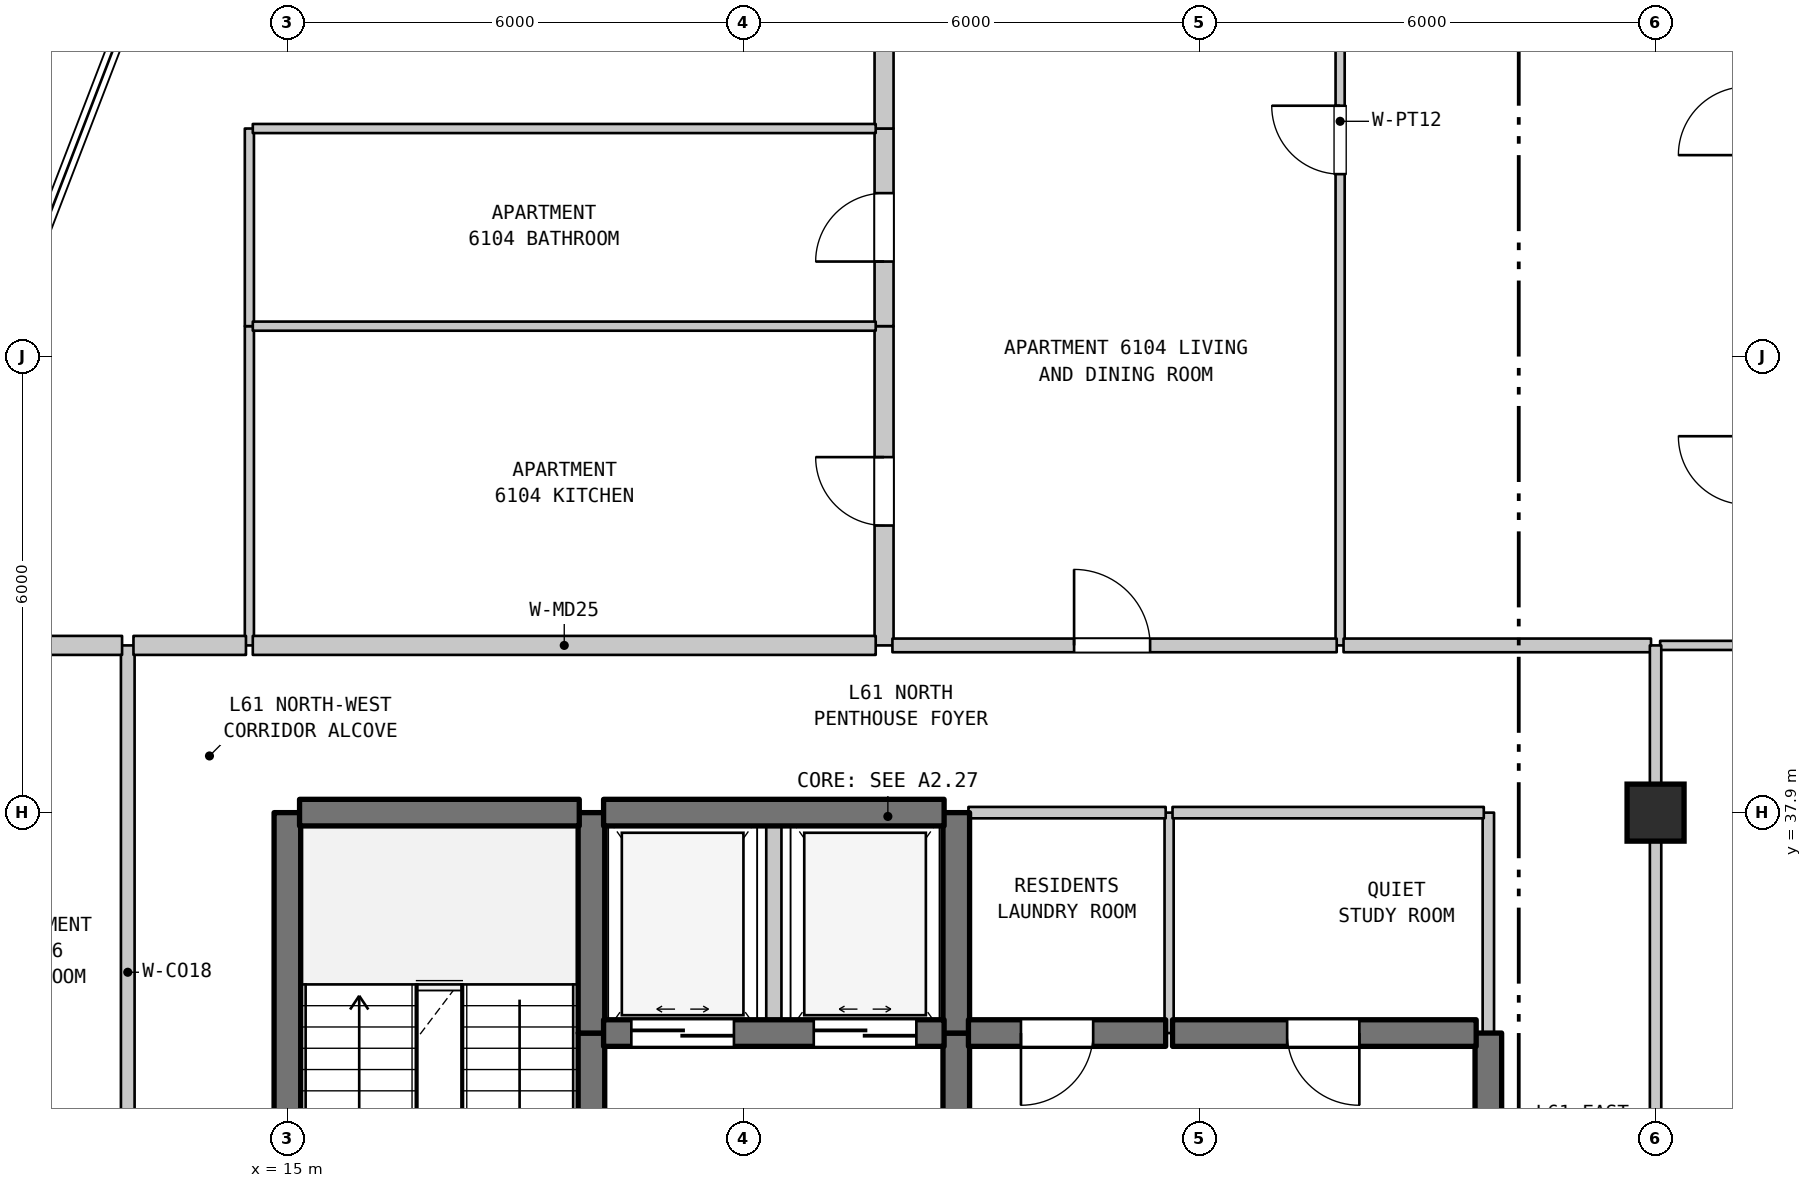
"""IFC4 building model, lengths in metres.
Left out: names, types, materials, properties, quantities, classifications, styles, units other than length and angle.
Written with IfcOpenShell. Run it as: python <this file> out.ifc"""

import sys

from ifc_helpers import new_model, si_unit, direction, frame, frame_2d, origin, origin_2d, place, context, subcontext, project, spatial, rectangle, extrude, element, fill, save


model = new_model("IFC4")
c1 = context("Model", 3, precision=1e-05, world=origin(), true_north=direction((0.0, 1.0)))
c2 = subcontext(c1, "Body", "Model", "MODEL_VIEW")
j1 = project(units=[si_unit("LENGTHUNIT", "METRE"), si_unit("PLANEANGLEUNIT", "RADIAN")], contexts=[c1])
p1 = place(None, origin())
s1 = spatial("IfcSite", under=j1, at=p1, CompositionType="ELEMENT")
p2 = place(p1, origin())
s2 = spatial("IfcBuilding", under=s1, at=p2, CompositionType="ELEMENT")
p3 = place(p2, frame((0.0, 0.0, 247.3)))
s3 = spatial("IfcBuildingStorey", under=s2, at=p3, CompositionType="ELEMENT", Elevation=247.3)
p4 = place(p3, frame((33.0, 37.9, 0.0), z_axis=(0.0, 0.0, 1.0), x_axis=(1.0, 0.0, 0.0)))
e1 = element("IfcColumn", 1, at=p4, inside=s3, PredefinedType="COLUMN", context=c2, shape_type="SweptSolid", body=[
    extrude(rectangle(XDim=0.75, YDim=0.75, at=origin_2d()), origin(), (0.0, 0.0, 1.0), 3.7),
])
p5 = place(p3, frame((12.9, 31.5, 0.0), z_axis=(0.0, 0.0, 1.0), x_axis=(0.0, 1.0, 0.0)))
e2 = element("IfcWall", 2, at=p5, inside=s3, PredefinedType="STANDARD", context=c2, shape_type="SweptSolid", body=[
    extrude(rectangle(XDim=8.6, YDim=0.18, at=frame_2d((4.3, 0.0))), origin(), (0.0, 0.0, 1.0), 3.39),
])
p6 = place(p3, frame((14.5, 40.1, 0.0), z_axis=(0.0, 0.0, 1.0), x_axis=(0.0, 1.0, 0.0)))
e3 = element("IfcWall", 3, at=p6, inside=s3, PredefinedType="PARTITIONING", context=c2, shape_type="SweptSolid", body=[
    extrude(rectangle(XDim=4.2, YDim=0.12, at=frame_2d((2.1, 0.0))), origin(), (0.0, 0.0, 1.0), 3.39),
])
p7 = place(p3, frame((14.5, 44.3, 0.0), z_axis=(0.0, 0.0, 1.0), x_axis=(0.0, 1.0, 0.0)))
e4 = element("IfcWall", 4, at=p7, inside=s3, PredefinedType="PARTITIONING", context=c2, shape_type="SweptSolid", body=[
    extrude(rectangle(XDim=2.6, YDim=0.12, at=frame_2d((1.3, 0.0))), origin(), (0.0, 0.0, 1.0), 3.39),
])
p8 = place(p3, frame((15.0, 31.1, 0.0), z_axis=(0.0, 0.0, 1.0), x_axis=(0.0, 1.0, 0.0)))
e5 = element("IfcWall", 5, at=p8, inside=s3, PredefinedType="SHEAR", context=c2, shape_type="SweptSolid", body=[
    extrude(rectangle(XDim=6.8, YDim=0.35, at=frame_2d((3.4, 0.0))), origin(), (0.0, 0.0, 1.0), 3.39),
])
p9 = place(p3, frame((19.0, 29.5, 0.0), z_axis=(0.0, 0.0, 1.0), x_axis=(0.0, 1.0, 0.0)))
e6 = element("IfcWall", 6, at=p9, inside=s3, PredefinedType="SHEAR", context=c2, shape_type="SweptSolid", body=[
    extrude(rectangle(XDim=5.5, YDim=0.35, at=frame_2d((2.75, 0.0))), origin(), (0.0, 0.0, 1.0), 3.39),
])
p10 = place(p9, frame((2.025, 0.0, 0.0)))
e7 = element("IfcOpeningElement", 7, at=p10, cuts=e6, PredefinedType="OPENING", context=c2, shape_type="SweptSolid", body=[
    extrude(rectangle(XDim=1.1, YDim=2.15, at=frame_2d((0.55, 1.075))), frame((0.0, 0.185, 0.0), z_axis=(0.0, -1.0, 0.0), x_axis=(1.0, 0.0, 0.0)), (0.0, 0.0, 1.0), 0.37),
])
p11 = place(p3, frame((19.0, 35.0, 0.0), z_axis=(0.0, 0.0, 1.0), x_axis=(0.0, 1.0, 0.0)))
e8 = element("IfcWall", 8, at=p11, inside=s3, PredefinedType="SHEAR", context=c2, shape_type="SweptSolid", body=[
    extrude(rectangle(XDim=2.9, YDim=0.35, at=frame_2d((1.45, 0.0))), origin(), (0.0, 0.0, 1.0), 3.39),
])
p12 = place(p3, frame((21.4, 35.0, 0.0), z_axis=(0.0, 0.0, 1.0), x_axis=(0.0, 1.0, 0.0)))
e9 = element("IfcWall", 9, at=p12, inside=s3, PredefinedType="STANDARD", context=c2, shape_type="SweptSolid", body=[
    extrude(rectangle(XDim=2.9, YDim=0.2, at=frame_2d((1.45, 0.0))), origin(), (0.0, 0.0, 1.0), 3.39),
])
p13 = place(p3, frame((22.85, 40.1, 0.0), z_axis=(0.0, 0.0, 1.0), x_axis=(0.0, 1.0, 0.0)))
e10 = element("IfcWall", 10, at=p13, inside=s3, PredefinedType="STANDARD", context=c2, shape_type="SweptSolid", body=[
    extrude(rectangle(XDim=4.2, YDim=0.25, at=frame_2d((2.1, 0.0))), origin(), (0.0, 0.0, 1.0), 3.39),
])
p14 = place(p13, frame((1.577, 0.0, 0.0)))
e11 = element("IfcOpeningElement", 11, at=p14, cuts=e10, PredefinedType="OPENING", context=c2, shape_type="SweptSolid", body=[
    extrude(rectangle(XDim=0.9, YDim=2.15, at=frame_2d((0.45, 1.075))), frame((0.0, 0.135, 0.0), z_axis=(0.0, -1.0, 0.0), x_axis=(1.0, 0.0, 0.0)), (0.0, 0.0, 1.0), 0.27),
])
p15 = place(p3, frame((22.85, 44.3, 0.0), z_axis=(0.0, 0.0, 1.0), x_axis=(0.0, 1.0, 0.0)))
e12 = element("IfcWall", 12, at=p15, inside=s3, PredefinedType="STANDARD", context=c2, shape_type="SweptSolid", body=[
    extrude(rectangle(XDim=2.6, YDim=0.25, at=frame_2d((1.3, 0.0))), origin(), (0.0, 0.0, 1.0), 3.39),
])
p16 = place(p15, frame((0.85, 0.0, 0.0)))
e13 = element("IfcOpeningElement", 13, at=p16, cuts=e12, PredefinedType="OPENING", context=c2, shape_type="SweptSolid", body=[
    extrude(rectangle(XDim=0.9, YDim=2.1, at=frame_2d((0.45, 1.05))), frame((0.0, 0.135, 0.0), z_axis=(0.0, -1.0, 0.0), x_axis=(1.0, 0.0, 0.0)), (0.0, 0.0, 1.0), 0.27),
])
p17 = place(p3, frame((22.85, 46.9, 0.0), z_axis=(0.0, 0.0, 1.0), x_axis=(0.0, 1.0, 0.0)))
e14 = element("IfcWall", 14, at=p17, inside=s3, PredefinedType="STANDARD", context=c2, shape_type="SweptSolid", body=[
    extrude(rectangle(XDim=6.99, YDim=0.25, at=frame_2d((3.495, 0.0))), origin(), (0.0, 0.0, 1.0), 3.39),
])
p18 = place(p17, frame((2.949, 0.0, 0.0)))
e15 = element("IfcOpeningElement", 15, at=p18, cuts=e14, PredefinedType="OPENING", context=c2, shape_type="SweptSolid", body=[
    extrude(rectangle(XDim=0.95, YDim=2.15, at=frame_2d((0.475, 1.075))), frame((0.0, 0.135, 0.0), z_axis=(0.0, -1.0, 0.0), x_axis=(1.0, 0.0, 0.0)), (0.0, 0.0, 1.0), 0.27),
])
p19 = place(p3, frame((23.8, 31.5, 0.0), z_axis=(0.0, 0.0, 1.0), x_axis=(0.0, 1.0, 0.0)))
e16 = element("IfcWall", 16, at=p19, inside=s3, PredefinedType="SHEAR", context=c2, shape_type="SweptSolid", body=[
    extrude(rectangle(XDim=3.5, YDim=0.35, at=frame_2d((1.75, 0.0))), origin(), (0.0, 0.0, 1.0), 3.39),
])
p20 = place(p19, frame((1.127, 0.0, 0.0)))
e17 = element("IfcOpeningElement", 17, at=p20, cuts=e16, PredefinedType="OPENING", context=c2, shape_type="SweptSolid", body=[
    extrude(rectangle(XDim=1.1, YDim=2.15, at=frame_2d((0.55, 1.075))), frame((0.0, 0.185, 0.0), z_axis=(0.0, -1.0, 0.0), x_axis=(1.0, 0.0, 0.0)), (0.0, 0.0, 1.0), 0.37),
])
p21 = place(p3, frame((23.8, 35.0, 0.0), z_axis=(0.0, 0.0, 1.0), x_axis=(0.0, 1.0, 0.0)))
e18 = element("IfcWall", 18, at=p21, inside=s3, PredefinedType="SHEAR", context=c2, shape_type="SweptSolid", body=[
    extrude(rectangle(XDim=2.9, YDim=0.35, at=frame_2d((1.45, 0.0))), origin(), (0.0, 0.0, 1.0), 3.39),
])
p22 = place(p3, frame((26.6, 35.0, 0.0), z_axis=(0.0, 0.0, 1.0), x_axis=(0.0, 1.0, 0.0)))
e19 = element("IfcWall", 19, at=p22, inside=s3, PredefinedType="PARTITIONING", context=c2, shape_type="SweptSolid", body=[
    extrude(rectangle(XDim=2.9, YDim=0.12, at=frame_2d((1.45, 0.0))), origin(), (0.0, 0.0, 1.0), 3.39),
])
p23 = place(p3, frame((28.85, 40.1, 0.0), z_axis=(0.0, 0.0, 1.0), x_axis=(0.0, 1.0, 0.0)))
e20 = element("IfcWall", 20, at=p23, inside=s3, PredefinedType="PARTITIONING", context=c2, shape_type="SweptSolid", body=[
    extrude(rectangle(XDim=13.79, YDim=0.12, at=frame_2d((6.895, 0.0))), origin(), (0.0, 0.0, 1.0), 3.39),
])
p24 = place(p23, frame((6.2, 0.0, 0.0)))
e21 = element("IfcOpeningElement", 21, at=p24, cuts=e20, PredefinedType="OPENING", context=c2, shape_type="SweptSolid", body=[
    extrude(rectangle(XDim=0.9, YDim=2.15, at=frame_2d((0.45, 1.075))), frame((0.0, 0.07, 0.0), z_axis=(0.0, -1.0, 0.0), x_axis=(1.0, 0.0, 0.0)), (0.0, 0.0, 1.0), 0.14),
])
p25 = place(p3, frame((30.8, 31.5, 0.0), z_axis=(0.0, 0.0, 1.0), x_axis=(0.0, 1.0, 0.0)))
e22 = element("IfcWall", 22, at=p25, inside=s3, PredefinedType="SHEAR", context=c2, shape_type="SweptSolid", body=[
    extrude(rectangle(XDim=3.5, YDim=0.35, at=frame_2d((1.75, 0.0))), origin(), (0.0, 0.0, 1.0), 3.39),
])
p26 = place(p25, frame((1.15, 0.0, 0.0)))
e23 = element("IfcOpeningElement", 23, at=p26, cuts=e22, PredefinedType="OPENING", context=c2, shape_type="SweptSolid", body=[
    extrude(rectangle(XDim=1.2, YDim=2.2, at=frame_2d((0.6, 1.1))), frame((0.0, 0.185, 0.0), z_axis=(0.0, -1.0, 0.0), x_axis=(1.0, 0.0, 0.0)), (0.0, 0.0, 1.0), 0.37),
])
p27 = place(p3, frame((30.8, 35.0, 0.0), z_axis=(0.0, 0.0, 1.0), x_axis=(0.0, 1.0, 0.0)))
e24 = element("IfcWall", 24, at=p27, inside=s3, PredefinedType="STANDARD", context=c2, shape_type="SweptSolid", body=[
    extrude(rectangle(XDim=2.9, YDim=0.15, at=frame_2d((1.45, 0.0))), origin(), (0.0, 0.0, 1.0), 3.39),
])
p28 = place(p3, frame((19.16, 35.0, 0.0), z_axis=(0.0, 0.0, 1.0), x_axis=(1.0, 0.0, 0.0)))
e25 = element("IfcWall", 25, at=p28, inside=s3, PredefinedType="SHEAR", context=c2, shape_type="SweptSolid", body=[
    extrude(rectangle(XDim=4.48, YDim=0.35, at=frame_2d((2.24, 0.0))), origin(), (0.0, 0.0, 1.0), 3.39),
])
p29 = place(p28, frame((0.365, 0.0, 0.0)))
e26 = element("IfcOpeningElement", 26, at=p29, cuts=e25, PredefinedType="OPENING", context=c2, shape_type="SweptSolid", body=[
    extrude(rectangle(XDim=1.35, YDim=2.2, at=frame_2d((0.675, 1.1))), frame((0.0, 0.185, 0.0), z_axis=(0.0, -1.0, 0.0), x_axis=(1.0, 0.0, 0.0)), (0.0, 0.0, 1.0), 0.37),
])
p30 = place(p28, frame((2.765, 0.0, 0.0)))
e27 = element("IfcOpeningElement", 27, at=p30, cuts=e25, PredefinedType="OPENING", context=c2, shape_type="SweptSolid", body=[
    extrude(rectangle(XDim=1.35, YDim=2.2, at=frame_2d((0.675, 1.1))), frame((0.0, 0.185, 0.0), z_axis=(0.0, -1.0, 0.0), x_axis=(1.0, 0.0, 0.0)), (0.0, 0.0, 1.0), 0.37),
])
p31 = place(p3, frame((23.96, 35.0, 0.0), z_axis=(0.0, 0.0, 1.0), x_axis=(1.0, 0.0, 0.0)))
e28 = element("IfcWall", 28, at=p31, inside=s3, PredefinedType="SHEAR", context=c2, shape_type="SweptSolid", body=[
    extrude(rectangle(XDim=2.595, YDim=0.35, at=frame_2d((1.297, 0.0))), origin(), (0.0, 0.0, 1.0), 3.39),
])
p32 = place(p31, frame((0.691, 0.0, 0.0)))
e29 = element("IfcOpeningElement", 29, at=p32, cuts=e28, PredefinedType="OPENING", context=c2, shape_type="SweptSolid", body=[
    extrude(rectangle(XDim=0.95, YDim=2.15, at=frame_2d((0.475, 1.075))), frame((0.0, 0.185, 0.0), z_axis=(0.0, -1.0, 0.0), x_axis=(1.0, 0.0, 0.0)), (0.0, 0.0, 1.0), 0.37),
])
p33 = place(p3, frame((26.645, 35.0, 0.0), z_axis=(0.0, 0.0, 1.0), x_axis=(1.0, 0.0, 0.0)))
e30 = element("IfcWall", 30, at=p33, inside=s3, PredefinedType="SHEAR", context=c2, shape_type="SweptSolid", body=[
    extrude(rectangle(XDim=3.995, YDim=0.35, at=frame_2d((1.998, 0.0))), origin(), (0.0, 0.0, 1.0), 3.39),
])
p34 = place(p33, frame((1.508, 0.0, 0.0)))
e31 = element("IfcOpeningElement", 31, at=p34, cuts=e30, PredefinedType="OPENING", context=c2, shape_type="SweptSolid", body=[
    extrude(rectangle(XDim=0.95, YDim=2.15, at=frame_2d((0.475, 1.075))), frame((0.0, 0.185, 0.0), z_axis=(0.0, -1.0, 0.0), x_axis=(1.0, 0.0, 0.0)), (0.0, 0.0, 1.0), 0.37),
])
p35 = place(p3, frame((15.16, 37.9, 0.0), z_axis=(0.0, 0.0, 1.0), x_axis=(1.0, 0.0, 0.0)))
e32 = element("IfcWall", 32, at=p35, inside=s3, PredefinedType="SHEAR", context=c2, shape_type="SweptSolid", body=[
    extrude(rectangle(XDim=3.68, YDim=0.35, at=frame_2d((1.84, 0.0))), origin(), (0.0, 0.0, 1.0), 3.39),
])
p36 = place(p3, frame((19.16, 37.9, 0.0), z_axis=(0.0, 0.0, 1.0), x_axis=(1.0, 0.0, 0.0)))
e33 = element("IfcWall", 33, at=p36, inside=s3, PredefinedType="SHEAR", context=c2, shape_type="SweptSolid", body=[
    extrude(rectangle(XDim=4.48, YDim=0.35, at=frame_2d((2.24, 0.0))), origin(), (0.0, 0.0, 1.0), 3.39),
])
p37 = place(p3, frame((23.96, 37.9, 0.0), z_axis=(0.0, 0.0, 1.0), x_axis=(1.0, 0.0, 0.0)))
e34 = element("IfcWall", 34, at=p37, inside=s3, PredefinedType="STANDARD", context=c2, shape_type="SweptSolid", body=[
    extrude(rectangle(XDim=2.595, YDim=0.15, at=frame_2d((1.297, 0.0))), origin(), (0.0, 0.0, 1.0), 2.89),
])
p38 = place(p3, frame((26.645, 37.9, 0.0), z_axis=(0.0, 0.0, 1.0), x_axis=(1.0, 0.0, 0.0)))
e35 = element("IfcWall", 35, at=p38, inside=s3, PredefinedType="STANDARD", context=c2, shape_type="SweptSolid", body=[
    extrude(rectangle(XDim=4.095, YDim=0.15, at=frame_2d((2.047, 0.0))), origin(), (0.0, 0.0, 1.0), 2.89),
])
p39 = place(p3, frame((10.623, 40.1, 0.0), z_axis=(0.0, 0.0, 1.0), x_axis=(1.0, 0.0, 0.0)))
e36 = element("IfcWall", 36, at=p39, inside=s3, PredefinedType="STANDARD", context=c2, shape_type="SweptSolid", body=[
    extrude(rectangle(XDim=2.202, YDim=0.25, at=frame_2d((1.101, 0.0))), origin(), (0.0, 0.0, 1.0), 3.39),
])
p40 = place(p3, frame((12.975, 40.1, 0.0), z_axis=(0.0, 0.0, 1.0), x_axis=(1.0, 0.0, 0.0)))
e37 = element("IfcWall", 37, at=p40, inside=s3, PredefinedType="STANDARD", context=c2, shape_type="SweptSolid", body=[
    extrude(rectangle(XDim=1.48, YDim=0.25, at=frame_2d((0.74, 0.0))), origin(), (0.0, 0.0, 1.0), 3.39),
])
p41 = place(p3, frame((14.545, 40.1, 0.0), z_axis=(0.0, 0.0, 1.0), x_axis=(1.0, 0.0, 0.0)))
e38 = element("IfcWall", 38, at=p41, inside=s3, PredefinedType="STANDARD", context=c2, shape_type="SweptSolid", body=[
    extrude(rectangle(XDim=8.195, YDim=0.25, at=frame_2d((4.098, 0.0))), origin(), (0.0, 0.0, 1.0), 3.39),
])
p42 = place(p3, frame((22.96, 40.1, 0.0), z_axis=(0.0, 0.0, 1.0), x_axis=(1.0, 0.0, 0.0)))
e39 = element("IfcWall", 39, at=p42, inside=s3, PredefinedType="STANDARD", context=c2, shape_type="SweptSolid", body=[
    extrude(rectangle(XDim=5.845, YDim=0.18, at=frame_2d((2.922, 0.0))), origin(), (0.0, 0.0, 1.0), 3.39),
])
p43 = place(p42, frame((2.39, 0.0, 0.0)))
e40 = element("IfcOpeningElement", 40, at=p43, cuts=e39, PredefinedType="OPENING", context=c2, shape_type="SweptSolid", body=[
    extrude(rectangle(XDim=1.0, YDim=2.15, at=frame_2d((0.5, 1.075))), frame((0.0, 0.1, 0.0), z_axis=(0.0, -1.0, 0.0), x_axis=(1.0, 0.0, 0.0)), (0.0, 0.0, 1.0), 0.2),
])
p44 = place(p3, frame((28.895, 40.1, 0.0), z_axis=(0.0, 0.0, 1.0), x_axis=(1.0, 0.0, 0.0)))
e41 = element("IfcWall", 41, at=p44, inside=s3, PredefinedType="STANDARD", context=c2, shape_type="SweptSolid", body=[
    extrude(rectangle(XDim=4.045, YDim=0.18, at=frame_2d((2.022, 0.0))), origin(), (0.0, 0.0, 1.0), 3.39),
])
p45 = place(p3, frame((33.06, 40.1, 0.0), z_axis=(0.0, 0.0, 1.0), x_axis=(1.0, 0.0, 0.0)))
e42 = element("IfcWall", 42, at=p45, inside=s3, PredefinedType="PARTITIONING", context=c2, shape_type="SweptSolid", body=[
    extrude(rectangle(XDim=1.115, YDim=0.12, at=frame_2d((0.558, 0.0))), origin(), (0.0, 0.0, 1.0), 3.39),
])
for number, where, z_axis, x_axis in (
    (43, (14.545, 44.3, 0.0), (0.0, 0.0, 1.0), (1.0, 0.0, 0.0)),
    (44, (14.545, 46.9, 0.0), (0.0, 0.0, 1.0), (1.0, 0.0, 0.0)),
):
    element("IfcWall", number, at=place(p3, frame(where, z_axis=z_axis, x_axis=x_axis)), inside=s3, PredefinedType="PARTITIONING", context=c2, shape_type="SweptSolid", body=[
        extrude(rectangle(XDim=8.195, YDim=0.12, at=frame_2d((4.098, 0.0))), origin(), (0.0, 0.0, 1.0), 3.39),
    ])
p46 = place(p3, frame((33.0, 27.9, 0.0), z_axis=(0.0, 0.0, 1.0), x_axis=(0.0, 1.0, 0.0)))
e45 = element("IfcWall", 45, at=p46, inside=s3, PredefinedType="STANDARD", context=c2, shape_type="SweptSolid", body=[
    extrude(rectangle(XDim=10.0, YDim=0.15, at=frame_2d((5.0, 0.0))), origin(), (0.0, 0.0, 1.0), 2.89),
])
p47 = place(p46, frame((1.4, 0.0, 0.0)))
e46 = element("IfcOpeningElement", 46, at=p47, cuts=e45, PredefinedType="OPENING", context=c2, shape_type="SweptSolid", body=[
    extrude(rectangle(XDim=1.0, YDim=2.15, at=frame_2d((0.5, 1.075))), frame((0.0, 0.085, 0.0), z_axis=(0.0, -1.0, 0.0), x_axis=(1.0, 0.0, 0.0)), (0.0, 0.0, 1.0), 0.17),
])
p48 = place(p3, frame((33.0, 37.9, 0.0), z_axis=(0.0, 0.0, 1.0), x_axis=(0.0, 1.0, 0.0)))
e47 = element("IfcWall", 47, at=p48, inside=s3, PredefinedType="STANDARD", context=c2, shape_type="SweptSolid", body=[
    extrude(rectangle(XDim=2.2, YDim=0.15, at=frame_2d((1.1, 0.0))), origin(), (0.0, 0.0, 1.0), 2.79),
])
p49 = place(p14, origin())
e48 = element("IfcDoor", 48, at=p49, inside=s3, OperationType="SINGLE_SWING_RIGHT", PredefinedType="DOOR", context=c2, shape_type="SweptSolid", body=[
    extrude(rectangle(XDim=0.9, YDim=2.15, at=frame_2d((0.45, 1.075))), frame((0.0, 0.025, 0.0), z_axis=(0.0, -1.0, 0.0), x_axis=(1.0, 0.0, 0.0)), (0.0, 0.0, 1.0), 0.05),
])
fill(e11, e48)
p50 = place(p16, origin())
e49 = element("IfcDoor", 49, at=p50, inside=s3, OperationType="SINGLE_SWING_LEFT", PredefinedType="DOOR", context=c2, shape_type="SweptSolid", body=[
    extrude(rectangle(XDim=0.9, YDim=2.1, at=frame_2d((0.45, 1.05))), frame((0.0, 0.025, 0.0), z_axis=(0.0, -1.0, 0.0), x_axis=(1.0, 0.0, 0.0)), (0.0, 0.0, 1.0), 0.05),
])
fill(e13, e49)
p51 = place(p24, origin())
e50 = element("IfcDoor", 50, at=p51, inside=s3, OperationType="SINGLE_SWING_RIGHT", PredefinedType="DOOR", context=c2, shape_type="SweptSolid", body=[
    extrude(rectangle(XDim=0.9, YDim=2.15, at=frame_2d((0.45, 1.075))), frame((0.0, 0.025, 0.0), z_axis=(0.0, -1.0, 0.0), x_axis=(1.0, 0.0, 0.0)), (0.0, 0.0, 1.0), 0.05),
])
fill(e21, e50)
p52 = place(p29, origin())
e51 = element("IfcDoor", 51, at=p52, inside=s3, OperationType="DOUBLE_DOOR_SLIDING", PredefinedType="DOOR", context=c2, shape_type="SweptSolid", body=[
    extrude(rectangle(XDim=1.35, YDim=2.2, at=frame_2d((0.675, 1.1))), frame((0.0, 0.025, 0.0), z_axis=(0.0, -1.0, 0.0), x_axis=(1.0, 0.0, 0.0)), (0.0, 0.0, 1.0), 0.05),
])
fill(e26, e51)
p53 = place(p30, origin())
e52 = element("IfcDoor", 52, at=p53, inside=s3, OperationType="DOUBLE_DOOR_SLIDING", PredefinedType="DOOR", context=c2, shape_type="SweptSolid", body=[
    extrude(rectangle(XDim=1.35, YDim=2.2, at=frame_2d((0.675, 1.1))), frame((0.0, 0.025, 0.0), z_axis=(0.0, -1.0, 0.0), x_axis=(1.0, 0.0, 0.0)), (0.0, 0.0, 1.0), 0.05),
])
fill(e27, e52)
p54 = place(p32, frame((0.95, 0.0, 0.0), z_axis=(0.0, 0.0, 1.0), x_axis=(-1.0, 0.0, 0.0)))
e53 = element("IfcDoor", 53, at=p54, inside=s3, OperationType="SINGLE_SWING_LEFT", PredefinedType="DOOR", context=c2, shape_type="SweptSolid", body=[
    extrude(rectangle(XDim=0.95, YDim=2.15, at=frame_2d((0.475, 1.075))), frame((0.0, 0.025, 0.0), z_axis=(0.0, -1.0, 0.0), x_axis=(1.0, 0.0, 0.0)), (0.0, 0.0, 1.0), 0.05),
])
fill(e29, e53)
p55 = place(p34, frame((0.95, 0.0, 0.0), z_axis=(0.0, 0.0, 1.0), x_axis=(-1.0, 0.0, 0.0)))
e54 = element("IfcDoor", 54, at=p55, inside=s3, OperationType="SINGLE_SWING_RIGHT", PredefinedType="DOOR", context=c2, shape_type="SweptSolid", body=[
    extrude(rectangle(XDim=0.95, YDim=2.15, at=frame_2d((0.475, 1.075))), frame((0.0, 0.025, 0.0), z_axis=(0.0, -1.0, 0.0), x_axis=(1.0, 0.0, 0.0)), (0.0, 0.0, 1.0), 0.05),
])
fill(e31, e54)
p56 = place(p43, origin())
e55 = element("IfcDoor", 55, at=p56, inside=s3, OperationType="SINGLE_SWING_LEFT", PredefinedType="DOOR", context=c2, shape_type="SweptSolid", body=[
    extrude(rectangle(XDim=1.0, YDim=2.15, at=frame_2d((0.5, 1.075))), frame((0.0, 0.025, 0.0), z_axis=(0.0, -1.0, 0.0), x_axis=(1.0, 0.0, 0.0)), (0.0, 0.0, 1.0), 0.05),
])
fill(e40, e55)
save(model, sys.argv[1])
